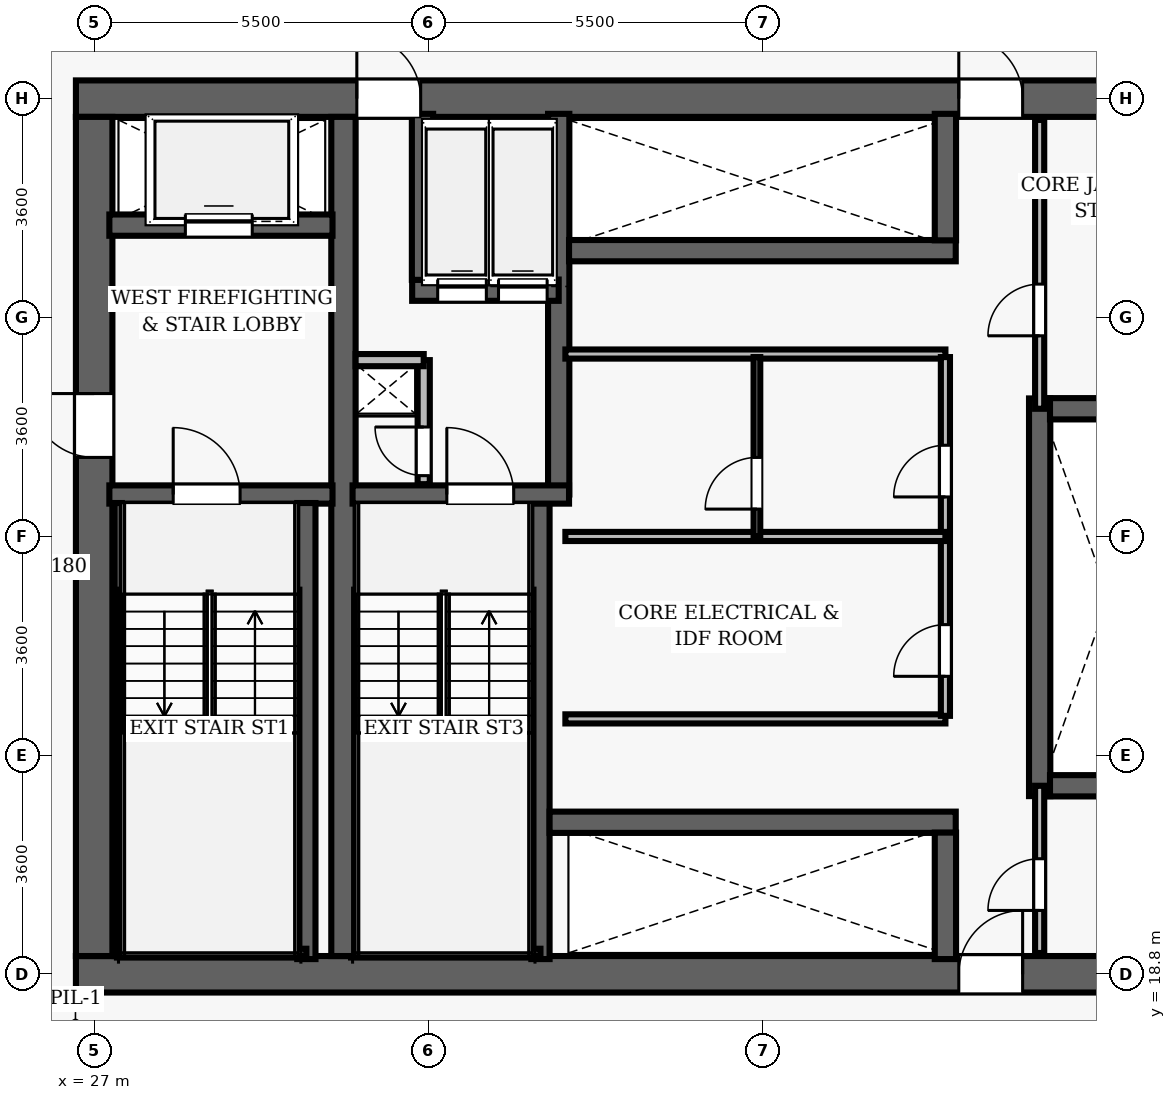
"""IFC4 building model, lengths in metres.
Left out: names, types, materials, properties, quantities, classifications, styles, units other than length and angle.
Written with IfcOpenShell. Run it as: python <this file> out.ifc"""

import sys

from ifc_helpers import new_model, si_unit, direction, frame, frame_2d, origin, place, context, subcontext, project, spatial, rectangle, extrude, element, fill, save


model = new_model("IFC4")
c1 = context("Model", 3, precision=1e-05, world=origin(), true_north=direction((0.0, 1.0)))
c2 = subcontext(c1, "Body", "Model", "MODEL_VIEW")
j1 = project(units=[si_unit("LENGTHUNIT", "METRE"), si_unit("PLANEANGLEUNIT", "RADIAN")], contexts=[c1])
p1 = place(None, origin())
s1 = spatial("IfcSite", under=j1, at=p1, CompositionType="ELEMENT")
p2 = place(p1, origin())
s2 = spatial("IfcBuilding", under=s1, at=p2, CompositionType="ELEMENT")
p3 = place(p2, frame((0.0, 0.0, 24.0)))
s3 = spatial("IfcBuildingStorey", under=s2, at=p3, CompositionType="ELEMENT", Elevation=24.0)
p4 = place(p3, frame((26.7, 18.8, 0.0), z_axis=(0.0, 0.0, 1.0), x_axis=(1.0, 0.0, 0.0)))
e1 = element("IfcWall", 1, at=p4, inside=s3, PredefinedType="SHEAR", context=c2, shape_type="SweptSolid", body=[
    extrude(rectangle(XDim=22.6, YDim=0.6, at=frame_2d((11.3, 0.0))), origin(), (0.0, 0.0, 1.0), 6.0),
])
p5 = place(p4, frame((14.52, 0.0, 0.0)))
e2 = element("IfcOpeningElement", 2, at=p5, cuts=e1, PredefinedType="OPENING", context=c2, shape_type="SweptSolid", body=[
    extrude(rectangle(XDim=1.05, YDim=2.15, at=frame_2d((0.525, 1.075))), frame((0.0, 0.31, 0.0), z_axis=(0.0, -1.0, 0.0), x_axis=(1.0, 0.0, 0.0)), (0.0, 0.0, 1.0), 0.62),
])
p6 = place(p3, frame((26.7, 33.2, 0.0), z_axis=(0.0, 0.0, 1.0), x_axis=(1.0, 0.0, 0.0)))
e3 = element("IfcWall", 3, at=p6, inside=s3, PredefinedType="SHEAR", context=c2, shape_type="SweptSolid", body=[
    extrude(rectangle(XDim=22.6, YDim=0.6, at=frame_2d((11.3, 0.0))), origin(), (0.0, 0.0, 1.0), 6.0),
])
p7 = place(p6, frame((4.62, 0.0, 0.0)))
e4 = element("IfcOpeningElement", 4, at=p7, cuts=e3, PredefinedType="OPENING", context=c2, shape_type="SweptSolid", body=[
    extrude(rectangle(XDim=1.05, YDim=2.15, at=frame_2d((0.525, 1.075))), frame((0.0, 0.31, 0.0), z_axis=(0.0, -1.0, 0.0), x_axis=(1.0, 0.0, 0.0)), (0.0, 0.0, 1.0), 0.62),
])
p8 = place(p6, frame((14.52, 0.0, 0.0)))
e5 = element("IfcOpeningElement", 5, at=p8, cuts=e3, PredefinedType="OPENING", context=c2, shape_type="SweptSolid", body=[
    extrude(rectangle(XDim=1.05, YDim=2.15, at=frame_2d((0.525, 1.075))), frame((0.0, 0.31, 0.0), z_axis=(0.0, -1.0, 0.0), x_axis=(1.0, 0.0, 0.0)), (0.0, 0.0, 1.0), 0.62),
])
p9 = place(p3, frame((27.0, 19.1, 0.0), z_axis=(0.0, 0.0, 1.0), x_axis=(0.0, 1.0, 0.0)))
e6 = element("IfcWall", 6, at=p9, inside=s3, PredefinedType="SHEAR", context=c2, shape_type="SweptSolid", body=[
    extrude(rectangle(XDim=13.8, YDim=0.6, at=frame_2d((6.9, 0.0))), origin(), (0.0, 0.0, 1.0), 6.0),
])
p10 = place(p9, frame((8.2, 0.0, 0.0)))
e7 = element("IfcOpeningElement", 7, at=p10, cuts=e6, PredefinedType="OPENING", context=c2, shape_type="SweptSolid", body=[
    extrude(rectangle(XDim=1.05, YDim=2.15, at=frame_2d((0.525, 1.075))), frame((0.0, 0.31, 0.0), z_axis=(0.0, -1.0, 0.0), x_axis=(1.0, 0.0, 0.0)), (0.0, 0.0, 1.0), 0.62),
])
p11 = place(p3, frame((31.1, 19.1, 0.0), z_axis=(0.0, 0.0, 1.0), x_axis=(0.0, 1.0, 0.0)))
e8 = element("IfcWall", 8, at=p11, inside=s3, PredefinedType="SHEAR", context=c2, shape_type="SweptSolid", body=[
    extrude(rectangle(XDim=13.8, YDim=0.4, at=frame_2d((6.9, 0.0))), origin(), (0.0, 0.0, 1.0), 6.0),
])
p12 = place(p3, frame((27.25, 26.69, 0.0), z_axis=(0.0, 0.0, 1.0), x_axis=(1.0, 0.0, 0.0)))
e9 = element("IfcWall", 9, at=p12, inside=s3, PredefinedType="SHEAR", context=c2, shape_type="SweptSolid", body=[
    extrude(rectangle(XDim=3.67, YDim=0.3, at=frame_2d((1.835, 0.0))), origin(), (0.0, 0.0, 1.0), 6.0),
])
p13 = place(p12, frame((1.05, 0.0, 0.0)))
e10 = element("IfcOpeningElement", 10, at=p13, cuts=e9, PredefinedType="OPENING", context=c2, shape_type="SweptSolid", body=[
    extrude(rectangle(XDim=1.1, YDim=2.15, at=frame_2d((0.55, 1.075))), frame((0.0, 0.16, 0.0), z_axis=(0.0, -1.0, 0.0), x_axis=(1.0, 0.0, 0.0)), (0.0, 0.0, 1.0), 0.32),
])
p14 = place(p3, frame((30.49, 19.05, 0.0), z_axis=(0.0, 0.0, 1.0), x_axis=(0.0, 1.0, 0.0)))
e11 = element("IfcWall", 11, at=p14, inside=s3, PredefinedType="SHEAR", context=c2, shape_type="SweptSolid", body=[
    extrude(rectangle(XDim=7.5, YDim=0.3, at=frame_2d((3.75, 0.0))), origin(), (0.0, 0.0, 1.0), 6.0),
])
p15 = place(p3, frame((27.395, 19.1, 0.0), z_axis=(0.0, 0.0, 1.0), x_axis=(0.0, 1.0, 0.0)))
e12 = element("IfcWall", 12, at=p15, inside=s3, PredefinedType="SHEAR", context=c2, shape_type="SweptSolid", body=[
    extrude(rectangle(XDim=7.45, YDim=0.12, at=frame_2d((3.725, 0.0))), origin(), (0.0, 0.0, 1.0), 6.0),
])
p16 = place(p3, frame((27.395, 19.16, 0.0), z_axis=(0.0, 0.0, 1.0), x_axis=(1.0, 0.0, 0.0)))
e13 = element("IfcWall", 13, at=p16, inside=s3, PredefinedType="SHEAR", context=c2, shape_type="SweptSolid", body=[
    extrude(rectangle(XDim=3.095, YDim=0.12, at=frame_2d((1.547, 0.0))), origin(), (0.0, 0.0, 1.0), 6.0),
])
p17 = place(p3, frame((27.25, 31.12, 0.0), z_axis=(0.0, 0.0, 1.0), x_axis=(1.0, 0.0, 0.0)))
e14 = element("IfcWall", 14, at=p17, inside=s3, PredefinedType="SHEAR", context=c2, shape_type="SweptSolid", body=[
    extrude(rectangle(XDim=3.67, YDim=0.35, at=frame_2d((1.835, 0.0))), origin(), (0.0, 0.0, 1.0), 4.71),
])
p18 = place(p17, frame((1.25, 0.0, 0.0)))
e15 = element("IfcOpeningElement", 15, at=p18, cuts=e14, PredefinedType="OPENING", context=c2, shape_type="SweptSolid", body=[
    extrude(rectangle(XDim=1.1, YDim=2.15, at=frame_2d((0.55, 1.075))), frame((0.0, 0.185, 0.0), z_axis=(0.0, -1.0, 0.0), x_axis=(1.0, 0.0, 0.0)), (0.0, 0.0, 1.0), 0.37),
])
p19 = place(p3, frame((34.34, 19.05, 0.0), z_axis=(0.0, 0.0, 1.0), x_axis=(0.0, 1.0, 0.0)))
e16 = element("IfcWall", 16, at=p19, inside=s3, PredefinedType="SHEAR", context=c2, shape_type="SweptSolid", body=[
    extrude(rectangle(XDim=7.5, YDim=0.3, at=frame_2d((3.75, 0.0))), origin(), (0.0, 0.0, 1.0), 6.0),
])
p20 = place(p3, frame((34.64, 26.69, 0.0), z_axis=(0.0, 0.0, 1.0), x_axis=(0.0, 1.0, 0.0)))
e17 = element("IfcWall", 17, at=p20, inside=s3, PredefinedType="SHEAR", context=c2, shape_type="SweptSolid", body=[
    extrude(rectangle(XDim=6.26, YDim=0.35, at=frame_2d((3.13, 0.0))), origin(), (0.0, 0.0, 1.0), 6.0),
])
p21 = place(p3, frame((31.25, 26.69, 0.0), z_axis=(0.0, 0.0, 1.0), x_axis=(1.0, 0.0, 0.0)))
e18 = element("IfcWall", 18, at=p21, inside=s3, PredefinedType="SHEAR", context=c2, shape_type="SweptSolid", body=[
    extrude(rectangle(XDim=3.56, YDim=0.3, at=frame_2d((1.78, 0.0))), origin(), (0.0, 0.0, 1.0), 6.0),
])
p22 = place(p21, frame((1.55, 0.0, 0.0)))
e19 = element("IfcOpeningElement", 19, at=p22, cuts=e18, PredefinedType="OPENING", context=c2, shape_type="SweptSolid", body=[
    extrude(rectangle(XDim=1.1, YDim=2.15, at=frame_2d((0.55, 1.075))), frame((0.0, 0.16, 0.0), z_axis=(0.0, -1.0, 0.0), x_axis=(1.0, 0.0, 0.0)), (0.0, 0.0, 1.0), 0.32),
])
p23 = place(p3, frame((31.3, 19.16, 0.0), z_axis=(0.0, 0.0, 1.0), x_axis=(1.0, 0.0, 0.0)))
e20 = element("IfcWall", 20, at=p23, inside=s3, PredefinedType="SHEAR", context=c2, shape_type="SweptSolid", body=[
    extrude(rectangle(XDim=3.04, YDim=0.12, at=frame_2d((1.52, 0.0))), origin(), (0.0, 0.0, 1.0), 6.0),
])
p24 = place(p3, frame((32.23, 30.05, 0.0), z_axis=(0.0, 0.0, 1.0), x_axis=(1.0, 0.0, 0.0)))
e21 = element("IfcWall", 21, at=p24, inside=s3, PredefinedType="SHEAR", context=c2, shape_type="SweptSolid", body=[
    extrude(rectangle(XDim=2.41, YDim=0.35, at=frame_2d((1.205, 0.0))), origin(), (0.0, 0.0, 1.0), 4.71),
])
p25 = place(p24, frame((0.42, 0.0, 0.0)))
e22 = element("IfcOpeningElement", 22, at=p25, cuts=e21, PredefinedType="OPENING", context=c2, shape_type="SweptSolid", body=[
    extrude(rectangle(XDim=0.8, YDim=2.15, at=frame_2d((0.4, 1.075))), frame((0.0, 0.185, 0.0), z_axis=(0.0, -1.0, 0.0), x_axis=(1.0, 0.0, 0.0)), (0.0, 0.0, 1.0), 0.37),
])
p26 = place(p24, frame((1.42, 0.0, 0.0)))
e23 = element("IfcOpeningElement", 23, at=p26, cuts=e21, PredefinedType="OPENING", context=c2, shape_type="SweptSolid", body=[
    extrude(rectangle(XDim=0.8, YDim=2.15, at=frame_2d((0.4, 1.075))), frame((0.0, 0.185, 0.0), z_axis=(0.0, -1.0, 0.0), x_axis=(1.0, 0.0, 0.0)), (0.0, 0.0, 1.0), 0.37),
])
p27 = place(p3, frame((32.4, 30.22, 0.0), z_axis=(0.0, 0.0, 1.0), x_axis=(0.0, 1.0, 0.0)))
e24 = element("IfcWall", 24, at=p27, inside=s3, PredefinedType="SHEAR", context=c2, shape_type="SweptSolid", body=[
    extrude(rectangle(XDim=2.73, YDim=0.35, at=frame_2d((1.365, 0.0))), origin(), (0.0, 0.0, 1.0), 4.71),
])
p28 = place(p3, frame((32.42, 26.86, 0.0), z_axis=(0.0, 0.0, 1.0), x_axis=(0.0, 1.0, 0.0)))
e25 = element("IfcWall", 25, at=p28, inside=s3, PredefinedType="PARTITIONING", context=c2, shape_type="SweptSolid", body=[
    extrude(rectangle(XDim=2.04, YDim=0.2, at=frame_2d((1.02, 0.0))), origin(), (0.0, 0.0, 1.0), 4.71),
])
p29 = place(p28, frame((0.14, 0.0, 0.0)))
e26 = element("IfcOpeningElement", 26, at=p29, cuts=e25, PredefinedType="OPENING", context=c2, shape_type="SweptSolid", body=[
    extrude(rectangle(XDim=0.8, YDim=2.05, at=frame_2d((0.4, 1.025))), frame((0.0, 0.11, 0.0), z_axis=(0.0, -1.0, 0.0), x_axis=(1.0, 0.0, 0.0)), (0.0, 0.0, 1.0), 0.22),
])
p30 = place(p3, frame((31.3, 28.9, 0.0), z_axis=(0.0, 0.0, 1.0), x_axis=(1.0, 0.0, 0.0)))
e27 = element("IfcWall", 27, at=p30, inside=s3, PredefinedType="PARTITIONING", context=c2, shape_type="SweptSolid", body=[
    extrude(rectangle(XDim=1.12, YDim=0.2, at=frame_2d((0.56, 0.0))), origin(), (0.0, 0.0, 1.0), 4.71),
])
p31 = place(p3, frame((42.55, 21.73, 0.0), z_axis=(0.0, 0.0, 1.0), x_axis=(0.0, 1.0, 0.0)))
e28 = element("IfcWall", 28, at=p31, inside=s3, PredefinedType="SHEAR", context=c2, shape_type="SweptSolid", body=[
    extrude(rectangle(XDim=6.54, YDim=0.35, at=frame_2d((3.27, 0.0))), origin(), (0.0, 0.0, 1.0), 4.71),
])
for number, where, z_axis, x_axis in (
    (29, (42.72, 21.9, 0.0), (0.0, 0.0, 1.0), (1.0, 0.0, 0.0)),
    (30, (42.72, 28.1, 0.0), (0.0, 0.0, 1.0), (1.0, 0.0, 0.0)),
):
    element("IfcWall", number, at=place(p3, frame(where, z_axis=z_axis, x_axis=x_axis)), inside=s3, PredefinedType="SHEAR", context=c2, shape_type="SweptSolid", body=[
        extrude(rectangle(XDim=2.03, YDim=0.35, at=frame_2d((1.015, 0.0))), origin(), (0.0, 0.0, 1.0), 4.71),
    ])
p32 = place(p3, frame((34.81, 30.7, 0.0), z_axis=(0.0, 0.0, 1.0), x_axis=(1.0, 0.0, 0.0)))
e31 = element("IfcWall", 31, at=p32, inside=s3, PredefinedType="SHEAR", context=c2, shape_type="SweptSolid", body=[
    extrude(rectangle(XDim=6.36, YDim=0.35, at=frame_2d((3.18, 0.0))), origin(), (0.0, 0.0, 1.0), 4.71),
])
p33 = place(p3, frame((41.0, 30.87, 0.0), z_axis=(0.0, 0.0, 1.0), x_axis=(0.0, 1.0, 0.0)))
e32 = element("IfcWall", 32, at=p33, inside=s3, PredefinedType="SHEAR", context=c2, shape_type="SweptSolid", body=[
    extrude(rectangle(XDim=2.08, YDim=0.35, at=frame_2d((1.04, 0.0))), origin(), (0.0, 0.0, 1.0), 4.71),
])
p34 = place(p3, frame((34.49, 21.3, 0.0), z_axis=(0.0, 0.0, 1.0), x_axis=(1.0, 0.0, 0.0)))
e33 = element("IfcWall", 33, at=p34, inside=s3, PredefinedType="SHEAR", context=c2, shape_type="SweptSolid", body=[
    extrude(rectangle(XDim=6.68, YDim=0.35, at=frame_2d((3.34, 0.0))), origin(), (0.0, 0.0, 1.0), 4.71),
])
p35 = place(p3, frame((41.0, 19.05, 0.0), z_axis=(0.0, 0.0, 1.0), x_axis=(0.0, 1.0, 0.0)))
e34 = element("IfcWall", 34, at=p35, inside=s3, PredefinedType="SHEAR", context=c2, shape_type="SweptSolid", body=[
    extrude(rectangle(XDim=2.08, YDim=0.35, at=frame_2d((1.04, 0.0))), origin(), (0.0, 0.0, 1.0), 4.71),
])
for number, where, z_axis, x_axis in (
    (35, (34.75, 29.0, 0.0), (0.0, 0.0, 1.0), (1.0, 0.0, 0.0)),
    (36, (34.75, 23.0, 0.0), (0.0, 0.0, 1.0), (1.0, 0.0, 0.0)),
):
    element("IfcWall", number, at=place(p3, frame(where, z_axis=z_axis, x_axis=x_axis)), inside=s3, PredefinedType="PARTITIONING", context=c2, shape_type="SweptSolid", body=[
        extrude(rectangle(XDim=6.25, YDim=0.15, at=frame_2d((3.125, 0.0))), origin(), (0.0, 0.0, 1.0), 4.71),
    ])
p36 = place(p3, frame((41.0, 23.05, 0.0), z_axis=(0.0, 0.0, 1.0), x_axis=(0.0, 1.0, 0.0)))
e37 = element("IfcWall", 37, at=p36, inside=s3, PredefinedType="PARTITIONING", context=c2, shape_type="SweptSolid", body=[
    extrude(rectangle(XDim=5.9, YDim=0.15, at=frame_2d((2.95, 0.0))), origin(), (0.0, 0.0, 1.0), 4.71),
])
p37 = place(p36, frame((0.65, 0.0, 0.0)))
e38 = element("IfcOpeningElement", 38, at=p37, cuts=e37, PredefinedType="OPENING", context=c2, shape_type="SweptSolid", body=[
    extrude(rectangle(XDim=0.85, YDim=2.1, at=frame_2d((0.425, 1.05))), frame((0.0, 0.085, 0.0), z_axis=(0.0, -1.0, 0.0), x_axis=(1.0, 0.0, 0.0)), (0.0, 0.0, 1.0), 0.17),
])
p38 = place(p36, frame((3.6, 0.0, 0.0)))
e39 = element("IfcOpeningElement", 39, at=p38, cuts=e37, PredefinedType="OPENING", context=c2, shape_type="SweptSolid", body=[
    extrude(rectangle(XDim=0.85, YDim=2.1, at=frame_2d((0.425, 1.05))), frame((0.0, 0.085, 0.0), z_axis=(0.0, -1.0, 0.0), x_axis=(1.0, 0.0, 0.0)), (0.0, 0.0, 1.0), 0.17),
])
p39 = place(p3, frame((34.75, 26.0, 0.0), z_axis=(0.0, 0.0, 1.0), x_axis=(1.0, 0.0, 0.0)))
e40 = element("IfcWall", 40, at=p39, inside=s3, PredefinedType="PARTITIONING", context=c2, shape_type="SweptSolid", body=[
    extrude(rectangle(XDim=6.25, YDim=0.15, at=frame_2d((3.125, 0.0))), origin(), (0.0, 0.0, 1.0), 4.71),
])
p40 = place(p3, frame((37.9, 26.0, 0.0), z_axis=(0.0, 0.0, 1.0), x_axis=(0.0, 1.0, 0.0)))
e41 = element("IfcWall", 41, at=p40, inside=s3, PredefinedType="PARTITIONING", context=c2, shape_type="SweptSolid", body=[
    extrude(rectangle(XDim=2.95, YDim=0.11, at=frame_2d((1.475, 0.0))), origin(), (0.0, 0.0, 1.0), 4.71),
])
p41 = place(p40, frame((0.45, 0.0, 0.0)))
e42 = element("IfcOpeningElement", 42, at=p41, cuts=e41, PredefinedType="OPENING", context=c2, shape_type="SweptSolid", body=[
    extrude(rectangle(XDim=0.85, YDim=2.1, at=frame_2d((0.425, 1.05))), frame((0.0, 0.065, 0.0), z_axis=(0.0, -1.0, 0.0), x_axis=(1.0, 0.0, 0.0)), (0.0, 0.0, 1.0), 0.13),
])
p42 = place(p3, frame((42.55, 28.1, 0.0), z_axis=(0.0, 0.0, 1.0), x_axis=(0.0, 1.0, 0.0)))
e43 = element("IfcWall", 43, at=p42, inside=s3, PredefinedType="PARTITIONING", context=c2, shape_type="SweptSolid", body=[
    extrude(rectangle(XDim=4.75, YDim=0.15, at=frame_2d((2.375, 0.0))), origin(), (0.0, 0.0, 1.0), 4.71),
])
p43 = place(p42, frame((1.2, 0.0, 0.0)))
e44 = element("IfcOpeningElement", 44, at=p43, cuts=e43, PredefinedType="OPENING", context=c2, shape_type="SweptSolid", body=[
    extrude(rectangle(XDim=0.85, YDim=2.1, at=frame_2d((0.425, 1.05))), frame((0.0, 0.085, 0.0), z_axis=(0.0, -1.0, 0.0), x_axis=(1.0, 0.0, 0.0)), (0.0, 0.0, 1.0), 0.17),
])
p44 = place(p3, frame((42.55, 19.15, 0.0), z_axis=(0.0, 0.0, 1.0), x_axis=(0.0, 1.0, 0.0)))
e45 = element("IfcWall", 45, at=p44, inside=s3, PredefinedType="PARTITIONING", context=c2, shape_type="SweptSolid", body=[
    extrude(rectangle(XDim=2.75, YDim=0.15, at=frame_2d((1.375, 0.0))), origin(), (0.0, 0.0, 1.0), 4.71),
])
p45 = place(p44, frame((0.7, 0.0, 0.0)))
e46 = element("IfcOpeningElement", 46, at=p45, cuts=e45, PredefinedType="OPENING", context=c2, shape_type="SweptSolid", body=[
    extrude(rectangle(XDim=0.85, YDim=2.1, at=frame_2d((0.425, 1.05))), frame((0.0, 0.085, 0.0), z_axis=(0.0, -1.0, 0.0), x_axis=(1.0, 0.0, 0.0)), (0.0, 0.0, 1.0), 0.17),
])
p46 = place(p13, origin())
e47 = element("IfcDoor", 47, at=p46, inside=s3, OperationType="SINGLE_SWING_LEFT", PredefinedType="DOOR", context=c2, shape_type="SweptSolid", body=[
    extrude(rectangle(XDim=1.1, YDim=2.15, at=frame_2d((0.55, 1.075))), frame((0.0, 0.025, 0.0), z_axis=(0.0, -1.0, 0.0), x_axis=(1.0, 0.0, 0.0)), (0.0, 0.0, 1.0), 0.05),
])
fill(e10, e47)
p47 = place(p10, origin())
e48 = element("IfcDoor", 48, at=p47, inside=s3, OperationType="SINGLE_SWING_RIGHT", PredefinedType="DOOR", context=c2, shape_type="SweptSolid", body=[
    extrude(rectangle(XDim=1.05, YDim=2.15, at=frame_2d((0.525, 1.075))), frame((0.0, 0.025, 0.0), z_axis=(0.0, -1.0, 0.0), x_axis=(1.0, 0.0, 0.0)), (0.0, 0.0, 1.0), 0.05),
])
fill(e7, e48)
p48 = place(p22, origin())
e49 = element("IfcDoor", 49, at=p48, inside=s3, OperationType="SINGLE_SWING_LEFT", PredefinedType="DOOR", context=c2, shape_type="SweptSolid", body=[
    extrude(rectangle(XDim=1.1, YDim=2.15, at=frame_2d((0.55, 1.075))), frame((0.0, 0.025, 0.0), z_axis=(0.0, -1.0, 0.0), x_axis=(1.0, 0.0, 0.0)), (0.0, 0.0, 1.0), 0.05),
])
fill(e19, e49)
p49 = place(p29, origin())
e50 = element("IfcDoor", 50, at=p49, inside=s3, OperationType="SINGLE_SWING_RIGHT", PredefinedType="DOOR", context=c2, shape_type="SweptSolid", body=[
    extrude(rectangle(XDim=0.8, YDim=2.05, at=frame_2d((0.4, 1.025))), frame((0.0, 0.025, 0.0), z_axis=(0.0, -1.0, 0.0), x_axis=(1.0, 0.0, 0.0)), (0.0, 0.0, 1.0), 0.05),
])
fill(e26, e50)
p50 = place(p7, origin())
e51 = element("IfcDoor", 51, at=p50, inside=s3, OperationType="SINGLE_SWING_LEFT", PredefinedType="DOOR", context=c2, shape_type="SweptSolid", body=[
    extrude(rectangle(XDim=1.05, YDim=2.15, at=frame_2d((0.525, 1.075))), frame((0.0, 0.025, 0.0), z_axis=(0.0, -1.0, 0.0), x_axis=(1.0, 0.0, 0.0)), (0.0, 0.0, 1.0), 0.05),
])
fill(e4, e51)
p51 = place(p8, origin())
e52 = element("IfcDoor", 52, at=p51, inside=s3, OperationType="SINGLE_SWING_LEFT", PredefinedType="DOOR", context=c2, shape_type="SweptSolid", body=[
    extrude(rectangle(XDim=1.05, YDim=2.15, at=frame_2d((0.525, 1.075))), frame((0.0, 0.025, 0.0), z_axis=(0.0, -1.0, 0.0), x_axis=(1.0, 0.0, 0.0)), (0.0, 0.0, 1.0), 0.05),
])
fill(e5, e52)
p52 = place(p5, origin())
e53 = element("IfcDoor", 53, at=p52, inside=s3, OperationType="SINGLE_SWING_RIGHT", PredefinedType="DOOR", context=c2, shape_type="SweptSolid", body=[
    extrude(rectangle(XDim=1.05, YDim=2.15, at=frame_2d((0.525, 1.075))), frame((0.0, 0.025, 0.0), z_axis=(0.0, -1.0, 0.0), x_axis=(1.0, 0.0, 0.0)), (0.0, 0.0, 1.0), 0.05),
])
fill(e2, e53)
p53 = place(p37, origin())
e54 = element("IfcDoor", 54, at=p53, inside=s3, OperationType="SINGLE_SWING_LEFT", PredefinedType="DOOR", context=c2, shape_type="SweptSolid", body=[
    extrude(rectangle(XDim=0.85, YDim=2.1, at=frame_2d((0.425, 1.05))), frame((0.0, 0.025, 0.0), z_axis=(0.0, -1.0, 0.0), x_axis=(1.0, 0.0, 0.0)), (0.0, 0.0, 1.0), 0.05),
])
fill(e38, e54)
p54 = place(p38, origin())
e55 = element("IfcDoor", 55, at=p54, inside=s3, OperationType="SINGLE_SWING_LEFT", PredefinedType="DOOR", context=c2, shape_type="SweptSolid", body=[
    extrude(rectangle(XDim=0.85, YDim=2.1, at=frame_2d((0.425, 1.05))), frame((0.0, 0.025, 0.0), z_axis=(0.0, -1.0, 0.0), x_axis=(1.0, 0.0, 0.0)), (0.0, 0.0, 1.0), 0.05),
])
fill(e39, e55)
p55 = place(p41, origin())
e56 = element("IfcDoor", 56, at=p55, inside=s3, OperationType="SINGLE_SWING_LEFT", PredefinedType="DOOR", context=c2, shape_type="SweptSolid", body=[
    extrude(rectangle(XDim=0.85, YDim=2.1, at=frame_2d((0.425, 1.05))), frame((0.0, 0.025, 0.0), z_axis=(0.0, -1.0, 0.0), x_axis=(1.0, 0.0, 0.0)), (0.0, 0.0, 1.0), 0.05),
])
fill(e42, e56)
p56 = place(p43, origin())
e57 = element("IfcDoor", 57, at=p56, inside=s3, OperationType="SINGLE_SWING_LEFT", PredefinedType="DOOR", context=c2, shape_type="SweptSolid", body=[
    extrude(rectangle(XDim=0.85, YDim=2.1, at=frame_2d((0.425, 1.05))), frame((0.0, 0.025, 0.0), z_axis=(0.0, -1.0, 0.0), x_axis=(1.0, 0.0, 0.0)), (0.0, 0.0, 1.0), 0.05),
])
fill(e44, e57)
p57 = place(p45, origin())
e58 = element("IfcDoor", 58, at=p57, inside=s3, OperationType="SINGLE_SWING_LEFT", PredefinedType="DOOR", context=c2, shape_type="SweptSolid", body=[
    extrude(rectangle(XDim=0.85, YDim=2.1, at=frame_2d((0.425, 1.05))), frame((0.0, 0.025, 0.0), z_axis=(0.0, -1.0, 0.0), x_axis=(1.0, 0.0, 0.0)), (0.0, 0.0, 1.0), 0.05),
])
fill(e46, e58)
p58 = place(p18, origin())
e59 = element("IfcDoor", 59, at=p58, inside=s3, OperationType="SLIDING_TO_LEFT", PredefinedType="DOOR", context=c2, shape_type="SweptSolid", body=[
    extrude(rectangle(XDim=1.1, YDim=2.15, at=frame_2d((0.55, 1.075))), frame((0.0, 0.025, 0.0), z_axis=(0.0, -1.0, 0.0), x_axis=(1.0, 0.0, 0.0)), (0.0, 0.0, 1.0), 0.05),
])
fill(e15, e59)
p59 = place(p25, origin())
e60 = element("IfcDoor", 60, at=p59, inside=s3, OperationType="SLIDING_TO_LEFT", PredefinedType="DOOR", context=c2, shape_type="SweptSolid", body=[
    extrude(rectangle(XDim=0.8, YDim=2.15, at=frame_2d((0.4, 1.075))), frame((0.0, 0.025, 0.0), z_axis=(0.0, -1.0, 0.0), x_axis=(1.0, 0.0, 0.0)), (0.0, 0.0, 1.0), 0.05),
])
fill(e22, e60)
p60 = place(p26, origin())
e61 = element("IfcDoor", 61, at=p60, inside=s3, OperationType="SLIDING_TO_LEFT", PredefinedType="DOOR", context=c2, shape_type="SweptSolid", body=[
    extrude(rectangle(XDim=0.8, YDim=2.15, at=frame_2d((0.4, 1.075))), frame((0.0, 0.025, 0.0), z_axis=(0.0, -1.0, 0.0), x_axis=(1.0, 0.0, 0.0)), (0.0, 0.0, 1.0), 0.05),
])
fill(e23, e61)
save(model, sys.argv[1])
